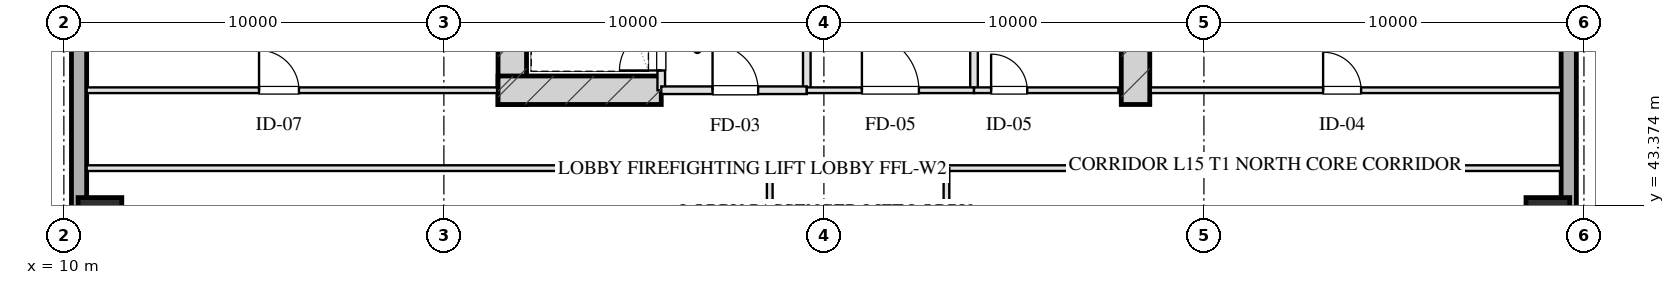
"""IFC4 building model, lengths in metres.
Left out: names, types, materials, properties, quantities, classifications, styles, units other than length and angle.
Written with IfcOpenShell. Run it as: python <this file> out.ifc"""

import sys

from ifc_helpers import new_model, si_unit, direction, frame, frame_2d, origin, origin_2d, place, context, subcontext, project, spatial, rectangle, hollow_rectangle, extrude, element, fill, save


model = new_model("IFC4")
c1 = context("Model", 3, precision=1e-05, world=origin(), true_north=direction((0.0, 1.0)))
c2 = subcontext(c1, "Body", "Model", "MODEL_VIEW")
j1 = project(units=[si_unit("LENGTHUNIT", "METRE"), si_unit("PLANEANGLEUNIT", "RADIAN")], contexts=[c1])
p1 = place(None, origin())
s1 = spatial("IfcSite", under=j1, at=p1, CompositionType="ELEMENT")
p2 = place(p1, origin())
s2 = spatial("IfcBuilding", under=s1, at=p2, CompositionType="ELEMENT")
p3 = place(p2, frame((0.0, 0.0, 64.4)))
s3 = spatial("IfcBuildingStorey", under=s2, at=p3, CompositionType="ELEMENT", Elevation=64.4)
for number, where, z_axis, x_axis in (
    (1, (21.8, 46.025, 0.0), (0.0, 0.0, 1.0), (0.0, 1.0, 0.0)),
    (2, (38.2, 46.025, 0.0), (0.0, 0.0, 1.0), (0.0, 1.0, 0.0)),
):
    element("IfcWall", number, at=place(p3, frame(where, z_axis=z_axis, x_axis=x_axis)), inside=s3, PredefinedType="SHEAR", context=c2, shape_type="SweptSolid", body=[
        extrude(rectangle(XDim=9.63, YDim=0.75, at=frame_2d((4.815, 0.0))), origin(), (0.0, 0.0, 1.0), 3.45),
    ])
p4 = place(p3, frame((21.425, 46.4, 0.0), z_axis=(0.0, 0.0, 1.0), x_axis=(1.0, 0.0, 0.0)))
e3 = element("IfcWall", 3, at=p4, inside=s3, PredefinedType="SHEAR", context=c2, shape_type="SweptSolid", body=[
    extrude(rectangle(XDim=4.295, YDim=0.75, at=frame_2d((2.147, 0.0))), origin(), (0.0, 0.0, 1.0), 3.45),
])
for number, where, z_axis, x_axis in (
    (4, (10.95, 43.0, 0.0), (0.0, 0.0, 1.0), (1.0, 0.0, 0.0)),
    (5, (49.05, 43.0, 0.0), (0.0, 0.0, 1.0), (1.0, 0.0, 0.0)),
):
    element("IfcColumn", number, at=place(p3, frame(where, z_axis=z_axis, x_axis=x_axis)), inside=s3, PredefinedType="COLUMN", context=c2, shape_type="SweptSolid", body=[
        extrude(hollow_rectangle(XDim=1.15, YDim=1.15, WallThickness=0.04, at=origin_2d()), origin(), (0.0, 0.0, 1.0), 3.451),
    ])
p5 = place(p3, frame((10.4, 7.2, 0.0), z_axis=(0.0, 0.0, 1.0), x_axis=(0.0, 1.0, 0.0)))
e6 = element("IfcWall", 6, at=p5, inside=s3, PredefinedType="SOLIDWALL", context=c2, shape_type="SweptSolid", body=[
    extrude(rectangle(XDim=53.6, YDim=0.4, at=frame_2d((26.8, 0.0))), origin(), (0.0, 0.0, 1.0), 2.61),
])
p6 = place(p5, frame((19.15, 0.0, 0.75)))
e7 = element("IfcOpeningElement", 7, at=p6, cuts=e6, PredefinedType="OPENING", context=c2, shape_type="SweptSolid", body=[
    extrude(rectangle(XDim=2.5, YDim=1.46, at=frame_2d((1.25, 0.73))), frame((0.0, 0.21, 0.0), z_axis=(0.0, -1.0, 0.0), x_axis=(1.0, 0.0, 0.0)), (0.0, 0.0, 1.0), 0.42),
])
p7 = place(p5, frame((31.95, 0.0, 0.75)))
e8 = element("IfcOpeningElement", 8, at=p7, cuts=e6, PredefinedType="OPENING", context=c2, shape_type="SweptSolid", body=[
    extrude(rectangle(XDim=2.5, YDim=1.46, at=frame_2d((1.25, 0.73))), frame((0.0, 0.21, 0.0), z_axis=(0.0, -1.0, 0.0), x_axis=(1.0, 0.0, 0.0)), (0.0, 0.0, 1.0), 0.42),
])
p8 = place(p3, frame((49.6, 60.8, 0.0), z_axis=(0.0, 0.0, 1.0), x_axis=(0.0, -1.0, 0.0)))
e9 = element("IfcWall", 9, at=p8, inside=s3, PredefinedType="SOLIDWALL", context=c2, shape_type="SweptSolid", body=[
    extrude(rectangle(XDim=53.6, YDim=0.4, at=frame_2d((26.8, 0.0))), origin(), (0.0, 0.0, 1.0), 2.61),
])
p9 = place(p8, frame((28.15, 0.0, 0.75)))
e10 = element("IfcOpeningElement", 10, at=p9, cuts=e9, PredefinedType="OPENING", context=c2, shape_type="SweptSolid", body=[
    extrude(rectangle(XDim=2.5, YDim=1.46, at=frame_2d((1.25, 0.73))), frame((0.0, 0.21, 0.0), z_axis=(0.0, -1.0, 0.0), x_axis=(1.0, 0.0, 0.0)), (0.0, 0.0, 1.0), 0.42),
])
p10 = place(p8, frame((22.95, 0.0, 0.75)))
e11 = element("IfcOpeningElement", 11, at=p10, cuts=e9, PredefinedType="OPENING", context=c2, shape_type="SweptSolid", body=[
    extrude(rectangle(XDim=2.5, YDim=1.46, at=frame_2d((1.25, 0.73))), frame((0.0, 0.21, 0.0), z_axis=(0.0, -1.0, 0.0), x_axis=(1.0, 0.0, 0.0)), (0.0, 0.0, 1.0), 0.42),
])
p11 = place(p3, frame((25.72, 46.4, 0.0), z_axis=(0.0, 0.0, 1.0), x_axis=(0.0, 1.0, 0.0)))
e12 = element("IfcWall", 12, at=p11, inside=s3, PredefinedType="PARTITIONING", context=c2, shape_type="SweptSolid", body=[
    extrude(rectangle(XDim=1.9, YDim=0.2, at=frame_2d((0.95, 0.0))), origin(), (0.0, 0.0, 1.0), 3.175),
])
p12 = place(p11, frame((0.52, 0.0, 0.0)))
e13 = element("IfcOpeningElement", 13, at=p12, cuts=e12, PredefinedType="OPENING", context=c2, shape_type="SweptSolid", body=[
    extrude(rectangle(XDim=1.1, YDim=2.05, at=frame_2d((0.55, 1.025))), frame((0.0, 0.11, 0.0), z_axis=(0.0, -1.0, 0.0), x_axis=(1.0, 0.0, 0.0)), (0.0, 0.0, 1.0), 0.22),
])
p13 = place(p3, frame((29.55, 46.4, 0.0), z_axis=(0.0, 0.0, 1.0), x_axis=(0.0, 1.0, 0.0)))
e14 = element("IfcWall", 14, at=p13, inside=s3, PredefinedType="PARTITIONING", context=c2, shape_type="SweptSolid", body=[
    extrude(rectangle(XDim=8.43, YDim=0.2, at=frame_2d((4.215, 0.0))), origin(), (0.0, 0.0, 1.0), 3.175),
])
p14 = place(p3, frame((25.72, 46.4, 0.0), z_axis=(0.0, 0.0, 1.0), x_axis=(1.0, 0.0, 0.0)))
e15 = element("IfcWall", 15, at=p14, inside=s3, PredefinedType="PARTITIONING", context=c2, shape_type="SweptSolid", body=[
    extrude(rectangle(XDim=3.83, YDim=0.2, at=frame_2d((1.915, 0.0))), origin(), (0.0, 0.0, 1.0), 3.175),
])
p15 = place(p14, frame((1.35, 0.0, 0.0)))
e16 = element("IfcOpeningElement", 16, at=p15, cuts=e15, PredefinedType="OPENING", context=c2, shape_type="SweptSolid", body=[
    extrude(rectangle(XDim=1.2, YDim=2.05, at=frame_2d((0.6, 1.025))), frame((0.0, 0.11, 0.0), z_axis=(0.0, -1.0, 0.0), x_axis=(1.0, 0.0, 0.0)), (0.0, 0.0, 1.0), 0.22),
])
p16 = place(p3, frame((33.95, 46.4, 0.0), z_axis=(0.0, 0.0, 1.0), x_axis=(0.0, 1.0, 0.0)))
e17 = element("IfcWall", 17, at=p16, inside=s3, PredefinedType="PARTITIONING", context=c2, shape_type="SweptSolid", body=[
    extrude(rectangle(XDim=8.43, YDim=0.2, at=frame_2d((4.215, 0.0))), origin(), (0.0, 0.0, 1.0), 3.175),
])
p17 = place(p3, frame((29.55, 46.4, 0.0), z_axis=(0.0, 0.0, 1.0), x_axis=(1.0, 0.0, 0.0)))
e18 = element("IfcWall", 18, at=p17, inside=s3, PredefinedType="PARTITIONING", context=c2, shape_type="SweptSolid", body=[
    extrude(rectangle(XDim=4.4, YDim=0.15, at=frame_2d((2.2, 0.0))), origin(), (0.0, 0.0, 1.0), 3.175),
])
p18 = place(p17, frame((1.45, 0.0, 0.0)))
e19 = element("IfcOpeningElement", 19, at=p18, cuts=e18, PredefinedType="OPENING", context=c2, shape_type="SweptSolid", body=[
    extrude(rectangle(XDim=1.5, YDim=2.05, at=frame_2d((0.75, 1.025))), frame((0.0, 0.085, 0.0), z_axis=(0.0, -1.0, 0.0), x_axis=(1.0, 0.0, 0.0)), (0.0, 0.0, 1.0), 0.17),
])
p19 = place(p3, frame((33.95, 46.4, 0.0), z_axis=(0.0, 0.0, 1.0), x_axis=(1.0, 0.0, 0.0)))
e20 = element("IfcWall", 20, at=p19, inside=s3, PredefinedType="PARTITIONING", context=c2, shape_type="SweptSolid", body=[
    extrude(rectangle(XDim=3.8, YDim=0.15, at=frame_2d((1.9, 0.0))), origin(), (0.0, 0.0, 1.0), 3.175),
])
p20 = place(p19, frame((0.45, 0.0, 0.0)))
e21 = element("IfcOpeningElement", 21, at=p20, cuts=e20, PredefinedType="OPENING", context=c2, shape_type="SweptSolid", body=[
    extrude(rectangle(XDim=0.95, YDim=2.05, at=frame_2d((0.475, 1.025))), frame((0.0, 0.085, 0.0), z_axis=(0.0, -1.0, 0.0), x_axis=(1.0, 0.0, 0.0)), (0.0, 0.0, 1.0), 0.17),
])
p21 = place(p3, frame((10.6, 46.4, 0.0), z_axis=(0.0, 0.0, 1.0), x_axis=(1.0, 0.0, 0.0)))
e22 = element("IfcWall", 22, at=p21, inside=s3, PredefinedType="PARTITIONING", context=c2, shape_type="SweptSolid", body=[
    extrude(rectangle(XDim=10.8, YDim=0.15, at=frame_2d((5.4, 0.0))), origin(), (0.0, 0.0, 1.0), 3.175),
])
p22 = place(p21, frame((4.536, 0.0, 0.0)))
e23 = element("IfcOpeningElement", 23, at=p22, cuts=e22, PredefinedType="OPENING", context=c2, shape_type="SweptSolid", body=[
    extrude(rectangle(XDim=1.05, YDim=2.05, at=frame_2d((0.525, 1.025))), frame((0.0, 0.085, 0.0), z_axis=(0.0, -1.0, 0.0), x_axis=(1.0, 0.0, 0.0)), (0.0, 0.0, 1.0), 0.17),
])
p23 = place(p3, frame((38.6, 46.4, 0.0), z_axis=(0.0, 0.0, 1.0), x_axis=(1.0, 0.0, 0.0)))
e24 = element("IfcWall", 24, at=p23, inside=s3, PredefinedType="PARTITIONING", context=c2, shape_type="SweptSolid", body=[
    extrude(rectangle(XDim=10.8, YDim=0.15, at=frame_2d((5.4, 0.0))), origin(), (0.0, 0.0, 1.0), 3.175),
])
p24 = place(p23, frame((4.536, 0.0, 0.0)))
e25 = element("IfcOpeningElement", 25, at=p24, cuts=e24, PredefinedType="OPENING", context=c2, shape_type="SweptSolid", body=[
    extrude(rectangle(XDim=1.0, YDim=2.05, at=frame_2d((0.5, 1.025))), frame((0.0, 0.085, 0.0), z_axis=(0.0, -1.0, 0.0), x_axis=(1.0, 0.0, 0.0)), (0.0, 0.0, 1.0), 0.17),
])
p25 = place(p3, frame((10.6, 44.35, 0.0), z_axis=(0.0, 0.0, 1.0), x_axis=(1.0, 0.0, 0.0)))
e26 = element("IfcWall", 26, at=p25, inside=s3, PredefinedType="PARTITIONING", context=c2, shape_type="SweptSolid", body=[
    extrude(rectangle(XDim=17.975, YDim=0.15, at=frame_2d((8.987, 0.0))), origin(), (0.0, 0.0, 1.0), 3.175),
])
p26 = place(p3, frame((33.225, 44.35, 0.0), z_axis=(0.0, 0.0, 1.0), x_axis=(1.0, 0.0, 0.0)))
e27 = element("IfcWall", 27, at=p26, inside=s3, PredefinedType="PARTITIONING", context=c2, shape_type="SweptSolid", body=[
    extrude(rectangle(XDim=16.175, YDim=0.15, at=frame_2d((8.087, 0.0))), origin(), (0.0, 0.0, 1.0), 3.175),
])
p27 = place(p3, frame((28.575, 23.65, 0.0), z_axis=(0.0, 0.0, 1.0), x_axis=(0.0, 1.0, 0.0)))
e28 = element("IfcWall", 28, at=p27, inside=s3, PredefinedType="PARTITIONING", context=c2, shape_type="SweptSolid", body=[
    extrude(rectangle(XDim=20.7, YDim=0.15, at=frame_2d((10.35, 0.0))), origin(), (0.0, 0.0, 1.0), 3.175),
])
p28 = place(p27, frame((2.675, 0.0, 0.0)))
e29 = element("IfcOpeningElement", 29, at=p28, cuts=e28, PredefinedType="OPENING", context=c2, shape_type="SweptSolid", body=[
    extrude(rectangle(XDim=1.0, YDim=2.05, at=frame_2d((0.5, 1.025))), frame((0.0, 0.085, 0.0), z_axis=(0.0, -1.0, 0.0), x_axis=(1.0, 0.0, 0.0)), (0.0, 0.0, 1.0), 0.17),
])
p29 = place(p27, frame((9.85, 0.0, 0.0)))
e30 = element("IfcOpeningElement", 30, at=p29, cuts=e28, PredefinedType="OPENING", context=c2, shape_type="SweptSolid", body=[
    extrude(rectangle(XDim=1.0, YDim=2.05, at=frame_2d((0.5, 1.025))), frame((0.0, 0.085, 0.0), z_axis=(0.0, -1.0, 0.0), x_axis=(1.0, 0.0, 0.0)), (0.0, 0.0, 1.0), 0.17),
])
p30 = place(p27, frame((17.025, 0.0, 0.0)))
e31 = element("IfcOpeningElement", 31, at=p30, cuts=e28, PredefinedType="OPENING", context=c2, shape_type="SweptSolid", body=[
    extrude(rectangle(XDim=1.0, YDim=2.05, at=frame_2d((0.5, 1.025))), frame((0.0, 0.085, 0.0), z_axis=(0.0, -1.0, 0.0), x_axis=(1.0, 0.0, 0.0)), (0.0, 0.0, 1.0), 0.17),
])
p31 = place(p3, frame((33.225, 23.65, 0.0), z_axis=(0.0, 0.0, 1.0), x_axis=(0.0, 1.0, 0.0)))
e32 = element("IfcWall", 32, at=p31, inside=s3, PredefinedType="PARTITIONING", context=c2, shape_type="SweptSolid", body=[
    extrude(rectangle(XDim=20.7, YDim=0.15, at=frame_2d((10.35, 0.0))), origin(), (0.0, 0.0, 1.0), 3.175),
])
p32 = place(p31, frame((2.175, 0.0, 0.0)))
e33 = element("IfcOpeningElement", 33, at=p32, cuts=e32, PredefinedType="OPENING", context=c2, shape_type="SweptSolid", body=[
    extrude(rectangle(XDim=1.0, YDim=2.05, at=frame_2d((0.5, 1.025))), frame((0.0, 0.085, 0.0), z_axis=(0.0, -1.0, 0.0), x_axis=(1.0, 0.0, 0.0)), (0.0, 0.0, 1.0), 0.17),
])
p33 = place(p31, frame((7.69, 0.0, 0.0)))
e34 = element("IfcOpeningElement", 34, at=p33, cuts=e32, PredefinedType="OPENING", context=c2, shape_type="SweptSolid", body=[
    extrude(rectangle(XDim=1.0, YDim=2.05, at=frame_2d((0.5, 1.025))), frame((0.0, 0.085, 0.0), z_axis=(0.0, -1.0, 0.0), x_axis=(1.0, 0.0, 0.0)), (0.0, 0.0, 1.0), 0.17),
])
p34 = place(p31, frame((12.69, 0.0, 0.0)))
e35 = element("IfcOpeningElement", 35, at=p34, cuts=e32, PredefinedType="OPENING", context=c2, shape_type="SweptSolid", body=[
    extrude(rectangle(XDim=1.05, YDim=2.05, at=frame_2d((0.525, 1.025))), frame((0.0, 0.085, 0.0), z_axis=(0.0, -1.0, 0.0), x_axis=(1.0, 0.0, 0.0)), (0.0, 0.0, 1.0), 0.17),
])
p35 = place(p31, frame((17.525, 0.0, 0.0)))
e36 = element("IfcOpeningElement", 36, at=p35, cuts=e32, PredefinedType="OPENING", context=c2, shape_type="SweptSolid", body=[
    extrude(rectangle(XDim=1.0, YDim=2.05, at=frame_2d((0.5, 1.025))), frame((0.0, 0.085, 0.0), z_axis=(0.0, -1.0, 0.0), x_axis=(1.0, 0.0, 0.0)), (0.0, 0.0, 1.0), 0.17),
])
p36 = place(p12, origin())
e37 = element("IfcDoor", 37, at=p36, inside=s3, OperationType="SINGLE_SWING_LEFT", PredefinedType="DOOR", context=c2, shape_type="SweptSolid", body=[
    extrude(rectangle(XDim=1.1, YDim=2.05, at=frame_2d((0.55, 1.025))), frame((0.0, 0.025, 0.0), z_axis=(0.0, -1.0, 0.0), x_axis=(1.0, 0.0, 0.0)), (0.0, 0.0, 1.0), 0.05),
])
fill(e13, e37)
p37 = place(p15, origin())
e38 = element("IfcDoor", 38, at=p37, inside=s3, OperationType="SINGLE_SWING_LEFT", PredefinedType="DOOR", context=c2, shape_type="SweptSolid", body=[
    extrude(rectangle(XDim=1.2, YDim=2.05, at=frame_2d((0.6, 1.025))), frame((0.0, 0.025, 0.0), z_axis=(0.0, -1.0, 0.0), x_axis=(1.0, 0.0, 0.0)), (0.0, 0.0, 1.0), 0.05),
])
fill(e16, e38)
p38 = place(p18, origin())
e39 = element("IfcDoor", 39, at=p38, inside=s3, OperationType="SINGLE_SWING_LEFT", PredefinedType="DOOR", context=c2, shape_type="SweptSolid", body=[
    extrude(rectangle(XDim=1.5, YDim=2.05, at=frame_2d((0.75, 1.025))), frame((0.0, 0.025, 0.0), z_axis=(0.0, -1.0, 0.0), x_axis=(1.0, 0.0, 0.0)), (0.0, 0.0, 1.0), 0.05),
])
fill(e19, e39)
p39 = place(p20, origin())
e40 = element("IfcDoor", 40, at=p39, inside=s3, OperationType="SINGLE_SWING_LEFT", PredefinedType="DOOR", context=c2, shape_type="SweptSolid", body=[
    extrude(rectangle(XDim=0.95, YDim=2.05, at=frame_2d((0.475, 1.025))), frame((0.0, 0.025, 0.0), z_axis=(0.0, -1.0, 0.0), x_axis=(1.0, 0.0, 0.0)), (0.0, 0.0, 1.0), 0.05),
])
fill(e21, e40)
p40 = place(p22, origin())
e41 = element("IfcDoor", 41, at=p40, inside=s3, OperationType="SINGLE_SWING_LEFT", PredefinedType="DOOR", context=c2, shape_type="SweptSolid", body=[
    extrude(rectangle(XDim=1.05, YDim=2.05, at=frame_2d((0.525, 1.025))), frame((0.0, 0.025, 0.0), z_axis=(0.0, -1.0, 0.0), x_axis=(1.0, 0.0, 0.0)), (0.0, 0.0, 1.0), 0.05),
])
fill(e23, e41)
p41 = place(p24, origin())
e42 = element("IfcDoor", 42, at=p41, inside=s3, OperationType="SINGLE_SWING_LEFT", PredefinedType="DOOR", context=c2, shape_type="SweptSolid", body=[
    extrude(rectangle(XDim=1.0, YDim=2.05, at=frame_2d((0.5, 1.025))), frame((0.0, 0.025, 0.0), z_axis=(0.0, -1.0, 0.0), x_axis=(1.0, 0.0, 0.0)), (0.0, 0.0, 1.0), 0.05),
])
fill(e25, e42)
save(model, sys.argv[1])
